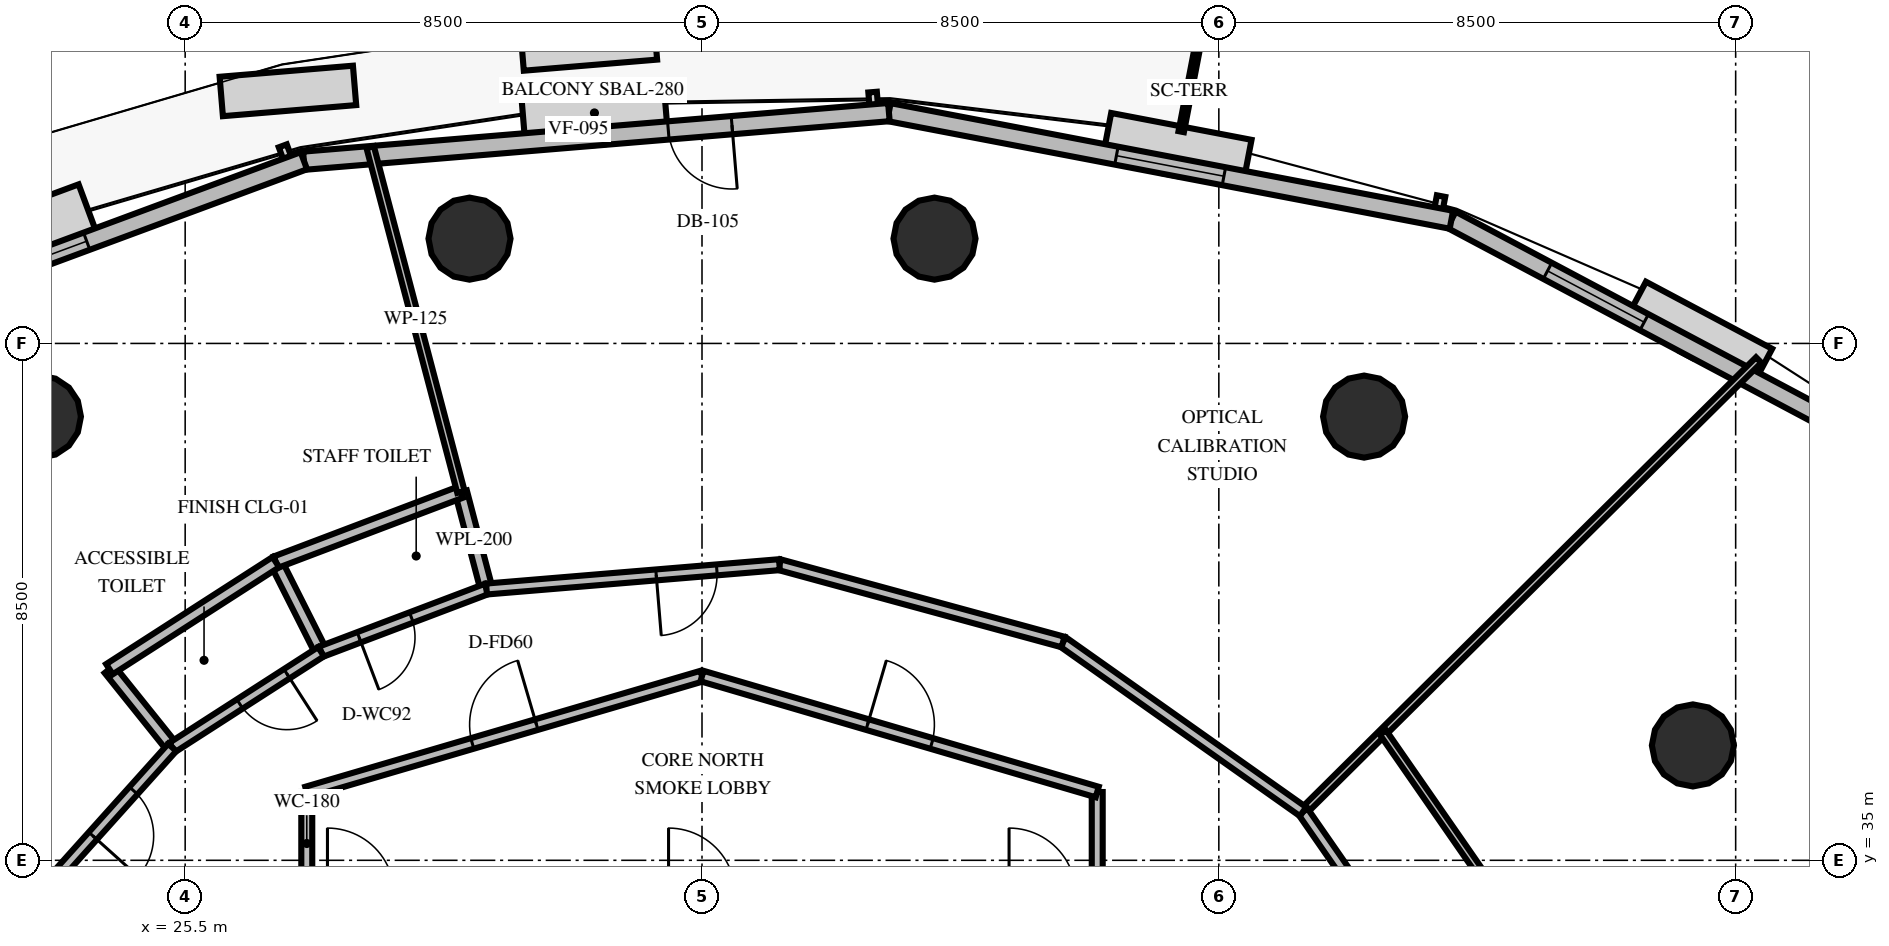
"""IFC4 building model, lengths in metres.
Left out: names, types, materials, properties, quantities, classifications, styles, units other than length and angle.
Written with IfcOpenShell. Run it as: python <this file> out.ifc"""

import sys

from ifc_helpers import new_model, si_unit, direction, frame, frame_2d, origin, origin_2d, place, context, subcontext, project, spatial, rectangle, circle, extrude, element, fill, save


model = new_model("IFC4")
c1 = context("Model", 3, precision=1e-05, world=origin(), true_north=direction((0.0, 1.0)))
c2 = subcontext(c1, "Body", "Model", "MODEL_VIEW")
j1 = project(units=[si_unit("LENGTHUNIT", "METRE"), si_unit("PLANEANGLEUNIT", "RADIAN")], contexts=[c1])
p1 = place(None, origin())
s1 = spatial("IfcSite", under=j1, at=p1, CompositionType="ELEMENT")
p2 = place(p1, origin())
s2 = spatial("IfcBuilding", under=s1, at=p2, CompositionType="ELEMENT")
p3 = place(p2, frame((0.0, 0.0, 51.0)))
s3 = spatial("IfcBuildingStorey", under=s2, at=p3, CompositionType="ELEMENT", Elevation=51.0)
for number, where, z_axis, x_axis in (
    (1, (50.297, 36.889, 0.0), (0.0, 0.0, 1.0), (1.0, 0.0, 0.0)),
    (2, (44.889, 42.297, 0.0), (0.0, 0.0, 1.0), (1.0, 0.0, 0.0)),
    (3, (37.824, 45.223, 0.0), (0.0, 0.0, 1.0), (1.0, 0.0, 0.0)),
    (4, (30.176, 45.223, 0.0), (0.0, 0.0, 1.0), (1.0, 0.0, 0.0)),
    (5, (23.111, 42.297, 0.0), (0.0, 0.0, 1.0), (1.0, 0.0, 0.0)),
):
    element("IfcColumn", number, at=place(p3, frame(where, z_axis=z_axis, x_axis=x_axis)), inside=s3, PredefinedType="COLUMN", context=c2, shape_type="SweptSolid", body=[
        extrude(circle(Radius=0.675, at=origin_2d()), origin(), (0.0, 0.0, 1.0), 4.2),
    ])
p4 = place(p3, frame((54.089, 41.408, 0.0), z_axis=(0.0, 0.0, 1.0), x_axis=(-0.883050641041, 0.46927770601, 0.0)))
e6 = element("IfcWall", 6, at=p4, inside=s3, PredefinedType="SOLIDWALL", context=c2, shape_type="SweptSolid", body=[
    extrude(rectangle(XDim=8.793, YDim=0.3, at=frame_2d((4.396, 0.0))), origin(), (0.0, 0.0, 1.0), 3.0),
])
p5 = place(p4, frame((5.202, 0.0, 0.8)))
e7 = element("IfcOpeningElement", 7, at=p5, cuts=e6, PredefinedType="OPENING", context=c2, shape_type="SweptSolid", body=[
    extrude(rectangle(XDim=1.8, YDim=1.95, at=frame_2d((0.9, 0.975))), frame((0.0, 0.16, 0.0), z_axis=(0.0, -1.0, 0.0), x_axis=(1.0, 0.0, 0.0)), (0.0, 0.0, 1.0), 0.32),
])
p6 = place(p3, frame((46.325, 45.534, 0.0), z_axis=(0.0, 0.0, 1.0), x_axis=(-0.982178716375, 0.187949379089, 0.0)))
e8 = element("IfcWall", 8, at=p6, inside=s3, PredefinedType="SOLIDWALL", context=c2, shape_type="SweptSolid", body=[
    extrude(rectangle(XDim=9.419, YDim=0.3, at=frame_2d((4.709, 0.0))), origin(), (0.0, 0.0, 1.0), 3.0),
])
p7 = place(p6, frame((3.809, 0.0, 0.8)))
e9 = element("IfcOpeningElement", 9, at=p7, cuts=e8, PredefinedType="OPENING", context=c2, shape_type="SweptSolid", body=[
    extrude(rectangle(XDim=1.8, YDim=1.95, at=frame_2d((0.9, 0.975))), frame((0.0, 0.16, 0.0), z_axis=(0.0, -1.0, 0.0), x_axis=(1.0, 0.0, 0.0)), (0.0, 0.0, 1.0), 0.32),
])
p8 = place(p3, frame((37.074, 47.304, 0.0), z_axis=(0.0, 0.0, 1.0), x_axis=(-0.99656491498, -0.082815277761, 0.0)))
e10 = element("IfcWall", 10, at=p8, inside=s3, PredefinedType="SOLIDWALL", context=c2, shape_type="SweptSolid", body=[
    extrude(rectangle(XDim=9.655, YDim=0.3, at=frame_2d((4.827, 0.0))), origin(), (0.0, 0.0, 1.0), 3.0),
])
p9 = place(p8, frame((2.59, 0.0, 0.0)))
e11 = element("IfcOpeningElement", 11, at=p9, cuts=e10, PredefinedType="OPENING", context=c2, shape_type="SweptSolid", body=[
    extrude(rectangle(XDim=1.05, YDim=2.15, at=frame_2d((0.525, 1.075))), frame((0.0, 0.16, 0.0), z_axis=(0.0, -1.0, 0.0), x_axis=(1.0, 0.0, 0.0)), (0.0, 0.0, 1.0), 0.32),
])
p10 = place(p3, frame((27.452, 46.505, 0.0), z_axis=(0.0, 0.0, 1.0), x_axis=(-0.937694031854, -0.347462088042, 0.0)))
e12 = element("IfcWall", 12, at=p10, inside=s3, PredefinedType="SOLIDWALL", context=c2, shape_type="SweptSolid", body=[
    extrude(rectangle(XDim=9.419, YDim=0.3, at=frame_2d((4.709, 0.0))), origin(), (0.0, 0.0, 1.0), 3.0),
])
p11 = place(p10, frame((3.809, 0.0, 0.8)))
e13 = element("IfcOpeningElement", 13, at=p11, cuts=e12, PredefinedType="OPENING", context=c2, shape_type="SweptSolid", body=[
    extrude(rectangle(XDim=1.8, YDim=1.95, at=frame_2d((0.9, 0.975))), frame((0.0, 0.16, 0.0), z_axis=(0.0, -1.0, 0.0), x_axis=(1.0, 0.0, 0.0)), (0.0, 0.0, 1.0), 0.32),
])
for number, where, z_axis, x_axis in (
    (14, (27.5, 34.43, 0.0), (0.0, 0.0, 1.0), (0.0, 1.0, 0.0)),
    (15, (40.5, 36.123, 0.0), (0.0, 0.0, 1.0), (0.0, -1.0, 0.0)),
):
    element("IfcWall", number, at=place(p3, frame(where, z_axis=z_axis, x_axis=x_axis)), inside=s3, PredefinedType="PARTITIONING", context=c2, shape_type="SweptSolid", body=[
        extrude(rectangle(XDim=1.693, YDim=0.18, at=frame_2d((0.846, 0.0))), origin(), (0.0, 0.0, 1.0), 3.0),
    ])
p12 = place(p3, frame((27.5, 36.123, 0.0), z_axis=(0.0, 0.0, 1.0), x_axis=(0.959546654541, 0.281549671923, 0.0)))
e16 = element("IfcWall", 16, at=p12, inside=s3, PredefinedType="PARTITIONING", context=c2, shape_type="SweptSolid", body=[
    extrude(rectangle(XDim=6.774, YDim=0.18, at=frame_2d((3.387, 0.0))), origin(), (0.0, 0.0, 1.0), 3.0),
])
p13 = place(p12, frame((2.837, 0.0, 0.0)))
e17 = element("IfcOpeningElement", 17, at=p13, cuts=e16, PredefinedType="OPENING", context=c2, shape_type="SweptSolid", body=[
    extrude(rectangle(XDim=1.1, YDim=2.15, at=frame_2d((0.55, 1.075))), frame((0.0, 0.1, 0.0), z_axis=(0.0, -1.0, 0.0), x_axis=(1.0, 0.0, 0.0)), (0.0, 0.0, 1.0), 0.2),
])
p14 = place(p3, frame((34.0, 38.03, 0.0), z_axis=(0.0, 0.0, 1.0), x_axis=(0.959546654541, -0.281549671923, 0.0)))
e18 = element("IfcWall", 18, at=p14, inside=s3, PredefinedType="PARTITIONING", context=c2, shape_type="SweptSolid", body=[
    extrude(rectangle(XDim=6.774, YDim=0.18, at=frame_2d((3.387, 0.0))), origin(), (0.0, 0.0, 1.0), 3.0),
])
p15 = place(p14, frame((2.837, 0.0, 0.0)))
e19 = element("IfcOpeningElement", 19, at=p15, cuts=e18, PredefinedType="OPENING", context=c2, shape_type="SweptSolid", body=[
    extrude(rectangle(XDim=1.1, YDim=2.15, at=frame_2d((0.55, 1.075))), frame((0.0, 0.1, 0.0), z_axis=(0.0, -1.0, 0.0), x_axis=(1.0, 0.0, 0.0)), (0.0, 0.0, 1.0), 0.2),
])
p16 = place(p3, frame((30.456, 39.461, 0.0), z_axis=(0.0, 0.0, 1.0), x_axis=(-0.25449329928, 0.967074537263, 0.0)))
e20 = element("IfcWall", 20, at=p16, inside=s3, PredefinedType="PLUMBINGWALL", context=c2, shape_type="SweptSolid", body=[
    extrude(rectangle(XDim=1.65, YDim=0.2, at=frame_2d((0.825, 0.0))), origin(), (0.0, 0.0, 1.0), 3.0),
])
p17 = place(p3, frame((27.735, 38.43, 0.0), z_axis=(0.0, 0.0, 1.0), x_axis=(-0.450111370482, 0.892972426317, 0.0)))
e21 = element("IfcWall", 21, at=p17, inside=s3, PredefinedType="PLUMBINGWALL", context=c2, shape_type="SweptSolid", body=[
    extrude(rectangle(XDim=1.65, YDim=0.2, at=frame_2d((0.825, 0.0))), origin(), (0.0, 0.0, 1.0), 3.0),
])
p18 = place(p3, frame((30.036, 41.057, 0.0), z_axis=(0.0, 0.0, 1.0), x_axis=(-0.935152668989, -0.354244951527, 0.0)))
e22 = element("IfcWall", 22, at=p18, inside=s3, PredefinedType="PLUMBINGWALL", context=c2, shape_type="SweptSolid", body=[
    extrude(rectangle(XDim=3.255, YDim=0.2, at=frame_2d((1.627, 0.0))), origin(), (0.0, 0.0, 1.0), 3.0),
])
p19 = place(p3, frame((30.456, 39.461, 0.0), z_axis=(0.0, 0.0, 1.0), x_axis=(-0.935158603079, -0.35422928604, 0.0)))
e23 = element("IfcWall", 23, at=p19, inside=s3, PredefinedType="PARTITIONING", context=c2, shape_type="SweptSolid", body=[
    extrude(rectangle(XDim=2.91, YDim=0.18, at=frame_2d((1.455, 0.0))), origin(), (0.0, 0.0, 1.0), 3.0),
])
p20 = place(p19, frame((1.321, 0.0, 0.0)))
e24 = element("IfcOpeningElement", 24, at=p20, cuts=e23, PredefinedType="OPENING", context=c2, shape_type="SweptSolid", body=[
    extrude(rectangle(XDim=0.92, YDim=2.1, at=frame_2d((0.46, 1.05))), frame((0.0, 0.1, 0.0), z_axis=(0.0, -1.0, 0.0), x_axis=(1.0, 0.0, 0.0)), (0.0, 0.0, 1.0), 0.2),
])
p21 = place(p3, frame((25.287, 36.856, 0.0), z_axis=(0.0, 0.0, 1.0), x_axis=(-0.625885246077, 0.779915161247, 0.0)))
e25 = element("IfcWall", 25, at=p21, inside=s3, PredefinedType="PLUMBINGWALL", context=c2, shape_type="SweptSolid", body=[
    extrude(rectangle(XDim=1.65, YDim=0.2, at=frame_2d((0.825, 0.0))), origin(), (0.0, 0.0, 1.0), 3.0),
])
p22 = place(p3, frame((26.992, 39.904, 0.0), z_axis=(0.0, 0.0, 1.0), x_axis=(-0.841020037303, -0.5410039712, 0.0)))
e26 = element("IfcWall", 26, at=p22, inside=s3, PredefinedType="PLUMBINGWALL", context=c2, shape_type="SweptSolid", body=[
    extrude(rectangle(XDim=3.255, YDim=0.2, at=frame_2d((1.627, 0.0))), origin(), (0.0, 0.0, 1.0), 3.0),
])
p23 = place(p3, frame((27.735, 38.43, 0.0), z_axis=(0.0, 0.0, 1.0), x_axis=(-0.841012166925, -0.541016205935, 0.0)))
e27 = element("IfcWall", 27, at=p23, inside=s3, PredefinedType="PARTITIONING", context=c2, shape_type="SweptSolid", body=[
    extrude(rectangle(XDim=2.91, YDim=0.18, at=frame_2d((1.455, 0.0))), origin(), (0.0, 0.0, 1.0), 3.0),
])
p24 = place(p23, frame((0.669, 0.0, 0.0)))
e28 = element("IfcOpeningElement", 28, at=p24, cuts=e27, PredefinedType="OPENING", context=c2, shape_type="SweptSolid", body=[
    extrude(rectangle(XDim=0.92, YDim=2.1, at=frame_2d((0.46, 1.05))), frame((0.0, 0.1, 0.0), z_axis=(0.0, -1.0, 0.0), x_axis=(1.0, 0.0, 0.0)), (0.0, 0.0, 1.0), 0.2),
])
p25 = place(p3, frame((30.036, 41.057, 0.0), z_axis=(0.0, 0.0, 1.0), x_axis=(-0.254595766502, 0.9670475664, 0.0)))
e29 = element("IfcWall", 29, at=p25, inside=s3, PredefinedType="PARTITIONING", context=c2, shape_type="SweptSolid", body=[
    extrude(rectangle(XDim=5.864, YDim=0.125, at=frame_2d((2.932, 0.0))), origin(), (0.0, 0.0, 1.0), 3.0),
])
p26 = place(p3, frame((25.287, 36.856, 0.0), z_axis=(0.0, 0.0, 1.0), x_axis=(-0.668041058899, -0.744124414077, 0.0)))
e30 = element("IfcWall", 30, at=p26, inside=s3, PredefinedType="PARTITIONING", context=c2, shape_type="SweptSolid", body=[
    extrude(rectangle(XDim=4.515, YDim=0.18, at=frame_2d((2.257, 0.0))), origin(), (0.0, 0.0, 1.0), 3.0),
])
p27 = place(p26, frame((0.954, 0.0, 0.0)))
e31 = element("IfcOpeningElement", 31, at=p27, cuts=e30, PredefinedType="OPENING", context=c2, shape_type="SweptSolid", body=[
    extrude(rectangle(XDim=1.0, YDim=2.15, at=frame_2d((0.5, 1.075))), frame((0.0, 0.1, 0.0), z_axis=(0.0, -1.0, 0.0), x_axis=(1.0, 0.0, 0.0)), (0.0, 0.0, 1.0), 0.2),
])
p28 = place(p3, frame((43.886, 35.8, 0.0), z_axis=(0.0, 0.0, 1.0), x_axis=(0.710177751737, 0.704022415082, 0.0)))
e32 = element("IfcWall", 32, at=p28, inside=s3, PredefinedType="PARTITIONING", context=c2, shape_type="SweptSolid", body=[
    extrude(rectangle(XDim=10.551, YDim=0.125, at=frame_2d((5.275, 0.0))), origin(), (0.0, 0.0, 1.0), 3.0),
])
p29 = place(p3, frame((46.641, 31.828, 0.0), z_axis=(0.0, 0.0, 1.0), x_axis=(-0.570000151009, 0.821644587306, 0.0)))
e33 = element("IfcWall", 33, at=p29, inside=s3, PredefinedType="PARTITIONING", context=c2, shape_type="SweptSolid", body=[
    extrude(rectangle(XDim=4.834, YDim=0.18, at=frame_2d((2.417, 0.0))), origin(), (0.0, 0.0, 1.0), 3.0),
])
p30 = place(p3, frame((48.321, 32.602, 0.0), z_axis=(0.0, 0.0, 1.0), x_axis=(-0.569974691464, 0.821662248792, 0.0)))
e34 = element("IfcWall", 34, at=p30, inside=s3, PredefinedType="PARTITIONING", context=c2, shape_type="SweptSolid", body=[
    extrude(rectangle(XDim=5.477, YDim=0.125, at=frame_2d((2.738, 0.0))), origin(), (0.0, 0.0, 1.0), 3.0),
])
p31 = place(p3, frame((43.886, 35.8, 0.0), z_axis=(0.0, 0.0, 1.0), x_axis=(-0.816630436939, 0.577160921636, 0.0)))
e35 = element("IfcWall", 35, at=p31, inside=s3, PredefinedType="PARTITIONING", context=c2, shape_type="SweptSolid", body=[
    extrude(rectangle(XDim=4.834, YDim=0.18, at=frame_2d((2.417, 0.0))), origin(), (0.0, 0.0, 1.0), 3.0),
])
p32 = place(p3, frame((39.938, 38.59, 0.0), z_axis=(0.0, 0.0, 1.0), x_axis=(-0.964791786171, 0.26301484623, 0.0)))
e36 = element("IfcWall", 36, at=p32, inside=s3, PredefinedType="PARTITIONING", context=c2, shape_type="SweptSolid", body=[
    extrude(rectangle(XDim=4.834, YDim=0.18, at=frame_2d((2.417, 0.0))), origin(), (0.0, 0.0, 1.0), 3.0),
])
p33 = place(p3, frame((35.274, 39.862, 0.0), z_axis=(0.0, 0.0, 1.0), x_axis=(-0.99656453954, -0.082819795523, 0.0)))
e37 = element("IfcWall", 37, at=p33, inside=s3, PredefinedType="PARTITIONING", context=c2, shape_type="SweptSolid", body=[
    extrude(rectangle(XDim=4.834, YDim=0.18, at=frame_2d((2.417, 0.0))), origin(), (0.0, 0.0, 1.0), 3.0),
])
p34 = place(p33, frame((1.034, 0.0, 0.0)))
e38 = element("IfcOpeningElement", 38, at=p34, cuts=e37, PredefinedType="OPENING", context=c2, shape_type="SweptSolid", body=[
    extrude(rectangle(XDim=1.0, YDim=2.15, at=frame_2d((0.5, 1.075))), frame((0.0, 0.1, 0.0), z_axis=(0.0, -1.0, 0.0), x_axis=(1.0, 0.0, 0.0)), (0.0, 0.0, 1.0), 0.2),
])
p35 = place(p5, origin())
e39 = element("IfcWindow", 39, at=p35, inside=s3, PartitioningType="SINGLE_PANEL", PredefinedType="WINDOW", context=c2, shape_type="SweptSolid", body=[
    extrude(rectangle(XDim=1.8, YDim=1.95, at=frame_2d((0.9, 0.975))), frame((0.0, 0.03, 0.0), z_axis=(0.0, -1.0, 0.0), x_axis=(1.0, 0.0, 0.0)), (0.0, 0.0, 1.0), 0.06),
])
fill(e7, e39)
p36 = place(p7, origin())
e40 = element("IfcWindow", 40, at=p36, inside=s3, PartitioningType="SINGLE_PANEL", PredefinedType="WINDOW", context=c2, shape_type="SweptSolid", body=[
    extrude(rectangle(XDim=1.8, YDim=1.95, at=frame_2d((0.9, 0.975))), frame((0.0, 0.03, 0.0), z_axis=(0.0, -1.0, 0.0), x_axis=(1.0, 0.0, 0.0)), (0.0, 0.0, 1.0), 0.06),
])
fill(e9, e40)
p37 = place(p9, origin())
e41 = element("IfcDoor", 41, at=p37, inside=s3, OperationType="SINGLE_SWING_LEFT", PredefinedType="DOOR", context=c2, shape_type="SweptSolid", body=[
    extrude(rectangle(XDim=1.05, YDim=2.15, at=frame_2d((0.525, 1.075))), frame((0.0, 0.025, 0.0), z_axis=(0.0, -1.0, 0.0), x_axis=(1.0, 0.0, 0.0)), (0.0, 0.0, 1.0), 0.05),
])
fill(e11, e41)
p38 = place(p11, origin())
e42 = element("IfcWindow", 42, at=p38, inside=s3, PartitioningType="SINGLE_PANEL", PredefinedType="WINDOW", context=c2, shape_type="SweptSolid", body=[
    extrude(rectangle(XDim=1.8, YDim=1.95, at=frame_2d((0.9, 0.975))), frame((0.0, 0.03, 0.0), z_axis=(0.0, -1.0, 0.0), x_axis=(1.0, 0.0, 0.0)), (0.0, 0.0, 1.0), 0.06),
])
fill(e13, e42)
p39 = place(p13, origin())
e43 = element("IfcDoor", 43, at=p39, inside=s3, OperationType="SINGLE_SWING_RIGHT", PredefinedType="DOOR", context=c2, shape_type="SweptSolid", body=[
    extrude(rectangle(XDim=1.1, YDim=2.15, at=frame_2d((0.55, 1.075))), frame((0.0, 0.025, 0.0), z_axis=(0.0, -1.0, 0.0), x_axis=(1.0, 0.0, 0.0)), (0.0, 0.0, 1.0), 0.05),
])
fill(e17, e43)
p40 = place(p15, origin())
e44 = element("IfcDoor", 44, at=p40, inside=s3, OperationType="SINGLE_SWING_LEFT", PredefinedType="DOOR", context=c2, shape_type="SweptSolid", body=[
    extrude(rectangle(XDim=1.1, YDim=2.15, at=frame_2d((0.55, 1.075))), frame((0.0, 0.025, 0.0), z_axis=(0.0, -1.0, 0.0), x_axis=(1.0, 0.0, 0.0)), (0.0, 0.0, 1.0), 0.05),
])
fill(e19, e44)
p41 = place(p20, origin())
e45 = element("IfcDoor", 45, at=p41, inside=s3, OperationType="SINGLE_SWING_RIGHT", PredefinedType="DOOR", context=c2, shape_type="SweptSolid", body=[
    extrude(rectangle(XDim=0.92, YDim=2.1, at=frame_2d((0.46, 1.05))), frame((0.0, 0.025, 0.0), z_axis=(0.0, -1.0, 0.0), x_axis=(1.0, 0.0, 0.0)), (0.0, 0.0, 1.0), 0.05),
])
fill(e24, e45)
p42 = place(p24, origin())
e46 = element("IfcDoor", 46, at=p42, inside=s3, OperationType="SINGLE_SWING_LEFT", PredefinedType="DOOR", context=c2, shape_type="SweptSolid", body=[
    extrude(rectangle(XDim=0.92, YDim=2.1, at=frame_2d((0.46, 1.05))), frame((0.0, 0.025, 0.0), z_axis=(0.0, -1.0, 0.0), x_axis=(1.0, 0.0, 0.0)), (0.0, 0.0, 1.0), 0.05),
])
fill(e28, e46)
p43 = place(p27, origin())
e47 = element("IfcDoor", 47, at=p43, inside=s3, OperationType="SINGLE_SWING_RIGHT", PredefinedType="DOOR", context=c2, shape_type="SweptSolid", body=[
    extrude(rectangle(XDim=1.0, YDim=2.15, at=frame_2d((0.5, 1.075))), frame((0.0, 0.025, 0.0), z_axis=(0.0, -1.0, 0.0), x_axis=(1.0, 0.0, 0.0)), (0.0, 0.0, 1.0), 0.05),
])
fill(e31, e47)
p44 = place(p34, origin())
e48 = element("IfcDoor", 48, at=p44, inside=s3, OperationType="SINGLE_SWING_RIGHT", PredefinedType="DOOR", context=c2, shape_type="SweptSolid", body=[
    extrude(rectangle(XDim=1.0, YDim=2.15, at=frame_2d((0.5, 1.075))), frame((0.0, 0.025, 0.0), z_axis=(0.0, -1.0, 0.0), x_axis=(1.0, 0.0, 0.0)), (0.0, 0.0, 1.0), 0.05),
])
fill(e38, e48)
save(model, sys.argv[1])
